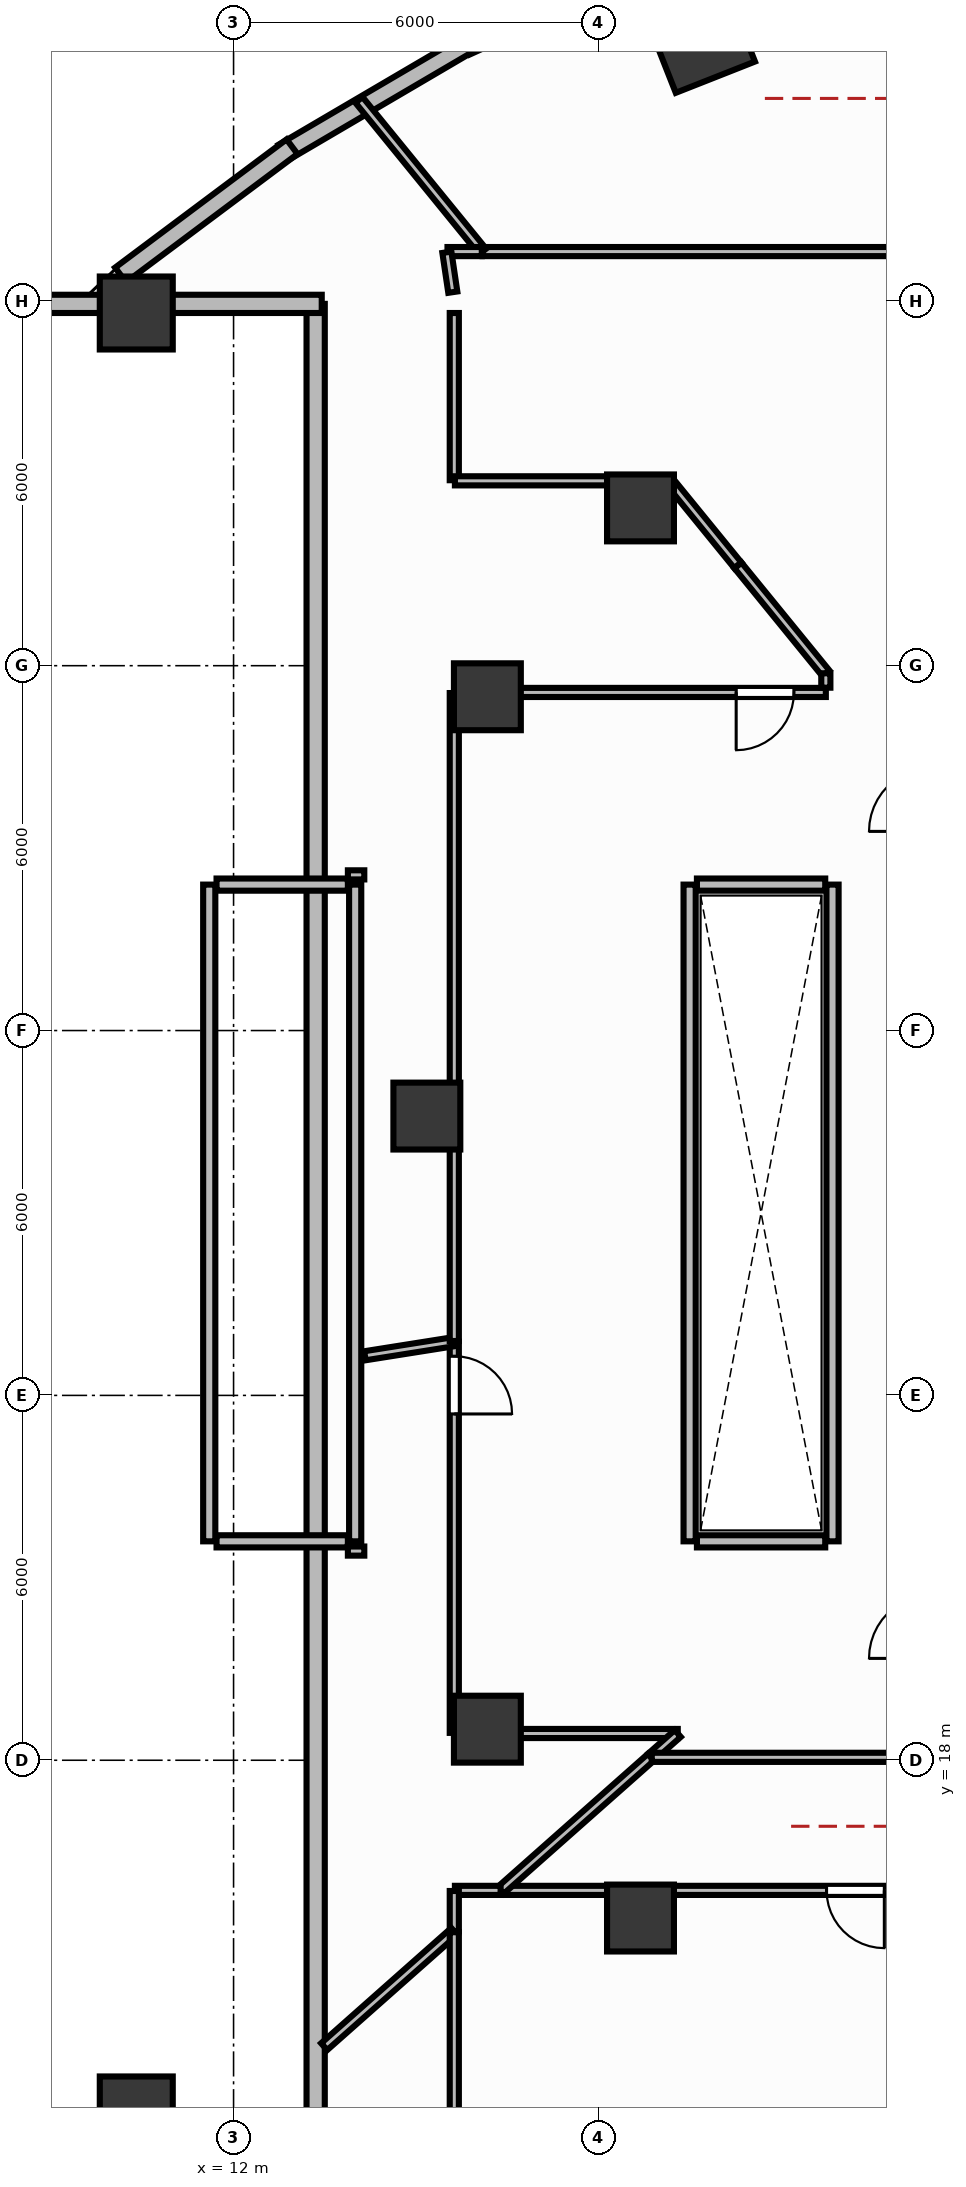
"""IFC4 building model, lengths in metres.
Left out: names, types, materials, properties, quantities, classifications, styles, units other than length and angle.
Written with IfcOpenShell. Run it as: python <this file> out.ifc"""

import sys

from ifc_helpers import new_model, si_unit, direction, frame, frame_2d, origin, origin_2d, place, context, subcontext, project, spatial, rectangle, extrude, element, fill, save


model = new_model("IFC4")
c1 = context("Model", 3, precision=1e-05, world=origin(), true_north=direction((0.0, 1.0)))
c2 = subcontext(c1, "Body", "Model", "MODEL_VIEW")
j1 = project(units=[si_unit("LENGTHUNIT", "METRE"), si_unit("PLANEANGLEUNIT", "RADIAN")], contexts=[c1])
p1 = place(None, origin())
s1 = spatial("IfcSite", under=j1, at=p1, CompositionType="ELEMENT")
p2 = place(p1, origin())
s2 = spatial("IfcBuilding", under=s1, at=p2, CompositionType="ELEMENT")
p3 = place(p2, frame((0.0, 0.0, 10.2)))
s3 = spatial("IfcBuildingStorey", under=s2, at=p3, CompositionType="ELEMENT", Elevation=10.2)
for number, where, z_axis, x_axis in (
    (1, (10.4, 12.2, -0.3), (0.0, 0.0, 1.0), (1.0, 0.0, 0.0)),
    (2, (10.4, 41.8, -0.3), (0.0, 0.0, 1.0), (1.0, 0.0, 0.0)),
):
    element("IfcColumn", number, at=place(p3, frame(where, z_axis=z_axis, x_axis=x_axis)), inside=s3, PredefinedType="COLUMN", context=c2, shape_type="SweptSolid", body=[
        extrude(rectangle(XDim=1.2, YDim=1.2, at=origin_2d()), origin(), (0.0, 0.0, 1.0), 4.75),
    ])
p4 = place(p3, frame((19.667, 46.329, -0.0), z_axis=(0.0, 0.0, 1.0), x_axis=(0.930225540858, 0.366988341962, 0.0)))
e3 = element("IfcColumn", 3, at=p4, inside=s3, PredefinedType="COLUMN", context=c2, shape_type="SweptSolid", body=[
    extrude(rectangle(XDim=1.4, YDim=1.4, at=origin_2d()), origin(), (0.0, 0.0, 1.0), 4.451),
])
for number, where, z_axis, x_axis in (
    (4, (18.692, 38.595, -0.0), (0.0, 0.0, 1.0), (1.0, 0.0, 0.0)),
    (5, (16.174, 35.489, -0.0), (0.0, 0.0, 1.0), (1.0, 0.0, 0.0)),
    (6, (15.179, 28.594, -0.0), (0.0, 0.0, 1.0), (1.0, 0.0, 0.0)),
    (7, (16.174, 18.511, -0.0), (0.0, 0.0, 1.0), (1.0, 0.0, 0.0)),
    (8, (18.692, 15.405, -0.0), (0.0, 0.0, 1.0), (1.0, 0.0, 0.0)),
):
    element("IfcColumn", number, at=place(p3, frame(where, z_axis=z_axis, x_axis=x_axis)), inside=s3, PredefinedType="COLUMN", context=c2, shape_type="SweptSolid", body=[
        extrude(rectangle(XDim=1.1, YDim=1.1, at=origin_2d()), origin(), (0.0, 0.0, 1.0), 4.451),
    ])
p5 = place(p3, frame((19.191, 47.717, 0.0), z_axis=(0.0, 0.0, 1.0), x_axis=(-0.910608120407, -0.413270917254, 0.0)))
e9 = element("IfcWall", 9, at=p5, inside=s3, PredefinedType="STANDARD", context=c2, shape_type="SweptSolid", body=[
    extrude(rectangle(XDim=3.7, YDim=0.3, at=frame_2d((1.85, 0.0))), origin(), (0.0, 0.0, 1.0), 4.45),
])
p6 = place(p5, frame((0.65, 0.0, 1.5)))
e10 = element("IfcOpeningElement", 10, at=p6, cuts=e9, PredefinedType="OPENING", context=c2, shape_type="SweptSolid", body=[
    extrude(rectangle(XDim=2.4, YDim=1.2, at=frame_2d((1.2, 0.6))), frame((0.0, 0.165, 0.0), z_axis=(0.0, -1.0, 0.0), x_axis=(1.0, 0.0, 0.0)), (0.0, 0.0, 1.0), 0.33),
])
p7 = place(p3, frame((15.951, 46.278, 0.0), z_axis=(0.0, 0.0, 1.0), x_axis=(-0.8624654944, -0.506115867139, 0.0)))
e11 = element("IfcWall", 11, at=p7, inside=s3, PredefinedType="STANDARD", context=c2, shape_type="SweptSolid", body=[
    extrude(rectangle(XDim=3.635, YDim=0.3, at=frame_2d((1.818, 0.0))), origin(), (0.0, 0.0, 1.0), 4.45),
])
p8 = place(p3, frame((12.961, 44.535, 0.0), z_axis=(0.0, 0.0, 1.0), x_axis=(-0.800823020995, -0.598901067827, 0.0)))
e12 = element("IfcWall", 12, at=p8, inside=s3, PredefinedType="STANDARD", context=c2, shape_type="SweptSolid", body=[
    extrude(rectangle(XDim=3.521, YDim=0.3, at=frame_2d((1.76, 0.0))), origin(), (0.0, 0.0, 1.0), 4.45),
])
p9 = place(p3, frame((13.35, 12.05, 0.0), z_axis=(0.0, 0.0, 1.0), x_axis=(0.0, 1.0, 0.0)))
e13 = element("IfcWall", 13, at=p9, inside=s3, PredefinedType="STANDARD", context=c2, shape_type="SweptSolid", body=[
    extrude(rectangle(XDim=29.9, YDim=0.3, at=frame_2d((14.95, 0.0))), origin(), (0.0, 0.0, 1.0), 4.45),
])
p10 = place(p3, frame((8.6, 41.95, 0.0), z_axis=(0.0, 0.0, 1.0), x_axis=(1.0, 0.0, 0.0)))
e14 = element("IfcWall", 14, at=p10, inside=s3, PredefinedType="STANDARD", context=c2, shape_type="SweptSolid", body=[
    extrude(rectangle(XDim=4.85, YDim=0.3, at=frame_2d((2.425, 0.0))), origin(), (0.0, 0.0, 1.0), 4.45),
])
for number, where, z_axis, x_axis in (
    (15, (11.6, 21.6, 0.0), (0.0, 0.0, 1.0), (0.0, 1.0, 0.0)),
    (16, (14.0, 21.6, 0.0), (0.0, 0.0, 1.0), (0.0, 1.0, 0.0)),
):
    element("IfcWall", number, at=place(p3, frame(where, z_axis=z_axis, x_axis=x_axis)), inside=s3, PredefinedType="PARTITIONING", context=c2, shape_type="SweptSolid", body=[
        extrude(rectangle(XDim=10.8, YDim=0.2, at=frame_2d((5.4, 0.0))), origin(), (0.0, 0.0, 1.0), 3.46),
    ])
for number, where, z_axis, x_axis in (
    (17, (11.72, 21.6, 0.0), (0.0, 0.0, 1.0), (1.0, 0.0, 0.0)),
    (18, (11.72, 32.4, 0.0), (0.0, 0.0, 1.0), (1.0, 0.0, 0.0)),
):
    element("IfcWall", number, at=place(p3, frame(where, z_axis=z_axis, x_axis=x_axis)), inside=s3, PredefinedType="PARTITIONING", context=c2, shape_type="SweptSolid", body=[
        extrude(rectangle(XDim=2.16, YDim=0.2, at=frame_2d((1.08, 0.0))), origin(), (0.0, 0.0, 1.0), 3.46),
    ])
for number, where, z_axis, x_axis in (
    (19, (19.5, 21.6, 0.0), (0.0, 0.0, 1.0), (0.0, 1.0, 0.0)),
    (20, (21.85, 21.6, 0.0), (0.0, 0.0, 1.0), (0.0, 1.0, 0.0)),
):
    element("IfcWall", number, at=place(p3, frame(where, z_axis=z_axis, x_axis=x_axis)), inside=s3, PredefinedType="PARTITIONING", context=c2, shape_type="SweptSolid", body=[
        extrude(rectangle(XDim=10.8, YDim=0.2, at=frame_2d((5.4, 0.0))), origin(), (0.0, 0.0, 1.0), 3.46),
    ])
for number, where, z_axis, x_axis in (
    (21, (19.62, 21.6, 0.0), (0.0, 0.0, 1.0), (1.0, 0.0, 0.0)),
    (22, (19.62, 32.4, 0.0), (0.0, 0.0, 1.0), (1.0, 0.0, 0.0)),
):
    element("IfcWall", number, at=place(p3, frame(where, z_axis=z_axis, x_axis=x_axis)), inside=s3, PredefinedType="PARTITIONING", context=c2, shape_type="SweptSolid", body=[
        extrude(rectangle(XDim=2.11, YDim=0.2, at=frame_2d((1.055, 0.0))), origin(), (0.0, 0.0, 1.0), 3.46),
    ])
p11 = place(p3, frame((15.63, 24.885, 0.0), z_axis=(0.0, 0.0, 1.0), x_axis=(0.0, -1.0, 0.0)))
e23 = element("IfcWall", 23, at=p11, inside=s3, PredefinedType="PARTITIONING", context=c2, shape_type="SweptSolid", body=[
    extrude(rectangle(XDim=6.435, YDim=0.15, at=frame_2d((3.217, 0.0))), origin(), (0.0, 0.0, 1.0), 3.46),
])
p12 = place(p11, frame((0.24, 0.0, 0.0)))
e24 = element("IfcOpeningElement", 24, at=p12, cuts=e23, PredefinedType="OPENING", context=c2, shape_type="SweptSolid", body=[
    extrude(rectangle(XDim=0.95, YDim=2.15, at=frame_2d((0.475, 1.075))), frame((0.0, 0.09, 0.0), z_axis=(0.0, -1.0, 0.0), x_axis=(1.0, 0.0, 0.0)), (0.0, 0.0, 1.0), 0.18),
])
p13 = place(p3, frame((24.298, 15.86, 0.0), z_axis=(0.0, 0.0, 1.0), x_axis=(-1.0, 0.0, 0.0)))
e25 = element("IfcWall", 25, at=p13, inside=s3, PredefinedType="PARTITIONING", context=c2, shape_type="SweptSolid", body=[
    extrude(rectangle(XDim=7.892, YDim=0.15, at=frame_2d((3.946, 0.0))), origin(), (0.0, 0.0, 1.0), 3.46),
])
p14 = place(p13, frame((1.596, 0.0, 0.0)))
e26 = element("IfcOpeningElement", 26, at=p14, cuts=e25, PredefinedType="OPENING", context=c2, shape_type="SweptSolid", body=[
    extrude(rectangle(XDim=0.95, YDim=2.15, at=frame_2d((0.475, 1.075))), frame((0.0, 0.09, 0.0), z_axis=(0.0, -1.0, 0.0), x_axis=(1.0, 0.0, 0.0)), (0.0, 0.0, 1.0), 0.18),
])
p15 = place(p3, frame((25.79, 42.81, 0.0), z_axis=(0.0, 0.0, 1.0), x_axis=(-1.0, 0.0, 0.0)))
e27 = element("IfcWall", 27, at=p15, inside=s3, PredefinedType="PARTITIONING", context=c2, shape_type="SweptSolid", body=[
    extrude(rectangle(XDim=9.695, YDim=0.15, at=frame_2d((4.847, 0.0))), origin(), (0.0, 0.0, 1.0), 3.46),
])
p16 = place(p15, frame((0.24, 0.0, 0.0)))
e28 = element("IfcOpeningElement", 28, at=p16, cuts=e27, PredefinedType="OPENING", context=c2, shape_type="SweptSolid", body=[
    extrude(rectangle(XDim=0.95, YDim=2.15, at=frame_2d((0.475, 1.075))), frame((0.0, 0.09, 0.0), z_axis=(0.0, -1.0, 0.0), x_axis=(1.0, 0.0, 0.0)), (0.0, 0.0, 1.0), 0.18),
])
p17 = place(p3, frame((21.74, 35.56, 0.0), z_axis=(0.0, 0.0, 1.0), x_axis=(-1.0, 0.0, 0.0)))
e29 = element("IfcWall", 29, at=p17, inside=s3, PredefinedType="PARTITIONING", context=c2, shape_type="SweptSolid", body=[
    extrude(rectangle(XDim=6.1, YDim=0.15, at=frame_2d((3.05, 0.0))), origin(), (0.0, 0.0, 1.0), 3.46),
])
p18 = place(p17, frame((0.524, 0.0, 0.0)))
e30 = element("IfcOpeningElement", 30, at=p18, cuts=e29, PredefinedType="OPENING", context=c2, shape_type="SweptSolid", body=[
    extrude(rectangle(XDim=0.95, YDim=2.15, at=frame_2d((0.475, 1.075))), frame((0.0, 0.09, 0.0), z_axis=(0.0, -1.0, 0.0), x_axis=(1.0, 0.0, 0.0)), (0.0, 0.0, 1.0), 0.18),
])
p19 = place(p3, frame((13.88, 21.44, 0.0), z_axis=(0.0, 0.0, 1.0), x_axis=(1.0, 0.0, 0.0)))
e31 = element("IfcWall", 31, at=p19, inside=s3, PredefinedType="PARTITIONING", context=c2, shape_type="SweptSolid", body=[
    extrude(rectangle(XDim=0.27, YDim=0.15, at=frame_2d((0.135, 0.0))), origin(), (0.0, 0.0, 1.0), 3.46),
])
p20 = place(p3, frame((14.16, 24.652, 0.0), z_axis=(0.0, 0.0, 1.0), x_axis=(0.987700362049, 0.156358545686, 0.0)))
e32 = element("IfcWall", 32, at=p20, inside=s3, PredefinedType="PARTITIONING", context=c2, shape_type="SweptSolid", body=[
    extrude(rectangle(XDim=1.488, YDim=0.15, at=frame_2d((0.744, 0.0))), origin(), (0.0, 0.0, 1.0), 3.46),
])
p21 = place(p3, frame((15.64, 18.44, 0.0), z_axis=(0.0, 0.0, 1.0), x_axis=(1.0, 0.0, 0.0)))
e33 = element("IfcWall", 33, at=p21, inside=s3, PredefinedType="PARTITIONING", context=c2, shape_type="SweptSolid", body=[
    extrude(rectangle(XDim=3.665, YDim=0.15, at=frame_2d((1.833, 0.0))), origin(), (0.0, 0.0, 1.0), 3.46),
])
p22 = place(p3, frame((19.305, 18.44, 0.0), z_axis=(0.0, 0.0, 1.0), x_axis=(-0.748582262775, -0.66304192617, 0.0)))
e34 = element("IfcWall", 34, at=p22, inside=s3, PredefinedType="PARTITIONING", context=c2, shape_type="SweptSolid", body=[
    extrude(rectangle(XDim=0.585, YDim=0.15, at=frame_2d((0.292, 0.0))), origin(), (0.0, 0.0, 1.0), 3.46),
])
p23 = place(p3, frame((18.862, 18.048, 0.0), z_axis=(0.0, 0.0, 1.0), x_axis=(-0.748677348716, -0.662934557494, 0.0)))
e35 = element("IfcWall", 35, at=p23, inside=s3, PredefinedType="PARTITIONING", context=c2, shape_type="SweptSolid", body=[
    extrude(rectangle(XDim=3.3, YDim=0.15, at=frame_2d((1.65, 0.0))), origin(), (0.0, 0.0, 1.0), 3.46),
])
p24 = place(p3, frame((16.392, 15.86, 0.0), z_axis=(0.0, 0.0, 1.0), x_axis=(-1.0, 0.0, 0.0)))
e36 = element("IfcWall", 36, at=p24, inside=s3, PredefinedType="PARTITIONING", context=c2, shape_type="SweptSolid", body=[
    extrude(rectangle(XDim=0.752, YDim=0.15, at=frame_2d((0.376, 0.0))), origin(), (0.0, 0.0, 1.0), 3.46),
])
p25 = place(p3, frame((15.63, 15.85, 0.0), z_axis=(0.0, 0.0, 1.0), x_axis=(0.0, -1.0, 0.0)))
e37 = element("IfcWall", 37, at=p25, inside=s3, PredefinedType="PARTITIONING", context=c2, shape_type="SweptSolid", body=[
    extrude(rectangle(XDim=0.665, YDim=0.15, at=frame_2d((0.333, 0.0))), origin(), (0.0, 0.0, 1.0), 3.46),
])
p26 = place(p3, frame((15.63, 15.185, 0.0), z_axis=(0.0, 0.0, 1.0), x_axis=(-0.748642683945, -0.662973703683, 0.0)))
e38 = element("IfcWall", 38, at=p26, inside=s3, PredefinedType="PARTITIONING", context=c2, shape_type="SweptSolid", body=[
    extrude(rectangle(XDim=2.858, YDim=0.15, at=frame_2d((1.429, 0.0))), origin(), (0.0, 0.0, 1.0), 3.46),
])
p27 = place(p3, frame((18.877, 18.048, 0.0), z_axis=(0.0, 0.0, 1.0), x_axis=(1.0, 0.0, 0.0)))
e39 = element("IfcWall", 39, at=p27, inside=s3, PredefinedType="PARTITIONING", context=c2, shape_type="SweptSolid", body=[
    extrude(rectangle(XDim=6.339, YDim=0.15, at=frame_2d((3.169, 0.0))), origin(), (0.0, 0.0, 1.0), 3.46),
])
p28 = place(p3, frame((15.63, 15.172, 0.0), z_axis=(0.0, 0.0, 1.0), x_axis=(0.0, -1.0, 0.0)))
e40 = element("IfcWall", 40, at=p28, inside=s3, PredefinedType="PARTITIONING", context=c2, shape_type="SweptSolid", body=[
    extrude(rectangle(XDim=2.972, YDim=0.15, at=frame_2d((1.486, 0.0))), origin(), (0.0, 0.0, 1.0), 3.46),
])
p29 = place(p3, frame((16.095, 42.81, 0.0), z_axis=(0.0, 0.0, 1.0), x_axis=(-0.631654377787, 0.775250119008, 0.0)))
e41 = element("IfcWall", 41, at=p29, inside=s3, PredefinedType="PARTITIONING", context=c2, shape_type="SweptSolid", body=[
    extrude(rectangle(XDim=3.219, YDim=0.15, at=frame_2d((1.609, 0.0))), origin(), (0.0, 0.0, 1.0), 3.46),
])
p30 = place(p3, frame((16.082, 42.81, 0.0), z_axis=(0.0, 0.0, 1.0), x_axis=(-1.0, 0.0, 0.0)))
e42 = element("IfcWall", 42, at=p30, inside=s3, PredefinedType="PARTITIONING", context=c2, shape_type="SweptSolid", body=[
    extrude(rectangle(XDim=0.564, YDim=0.15, at=frame_2d((0.282, 0.0))), origin(), (0.0, 0.0, 1.0), 3.46),
])
p31 = place(p3, frame((15.508, 42.799, 0.0), z_axis=(0.0, 0.0, 1.0), x_axis=(0.146882189547, -0.989153993266, 0.0)))
e43 = element("IfcWall", 43, at=p31, inside=s3, PredefinedType="PARTITIONING", context=c2, shape_type="SweptSolid", body=[
    extrude(rectangle(XDim=0.663, YDim=0.15, at=frame_2d((0.332, 0.0))), origin(), (0.0, 0.0, 1.0), 3.46),
])
p32 = place(p3, frame((15.63, 41.8, 0.0), z_axis=(0.0, 0.0, 1.0), x_axis=(0.0, -1.0, 0.0)))
e44 = element("IfcWall", 44, at=p32, inside=s3, PredefinedType="PARTITIONING", context=c2, shape_type="SweptSolid", body=[
    extrude(rectangle(XDim=2.75, YDim=0.15, at=frame_2d((1.375, 0.0))), origin(), (0.0, 0.0, 1.0), 3.46),
])
p33 = place(p3, frame((15.64, 39.04, 0.0), z_axis=(0.0, 0.0, 1.0), x_axis=(1.0, 0.0, 0.0)))
e45 = element("IfcWall", 45, at=p33, inside=s3, PredefinedType="PARTITIONING", context=c2, shape_type="SweptSolid", body=[
    extrude(rectangle(XDim=3.521, YDim=0.15, at=frame_2d((1.761, 0.0))), origin(), (0.0, 0.0, 1.0), 3.46),
])
p34 = place(p3, frame((19.161, 39.04, 0.0), z_axis=(0.0, 0.0, 1.0), x_axis=(0.631654738662, -0.775249824977, 0.0)))
e46 = element("IfcWall", 46, at=p34, inside=s3, PredefinedType="PARTITIONING", context=c2, shape_type="SweptSolid", body=[
    extrude(rectangle(XDim=1.79, YDim=0.15, at=frame_2d((0.895, 0.0))), origin(), (0.0, 0.0, 1.0), 3.46),
])
p35 = place(p3, frame((20.296, 37.648, 0.0), z_axis=(0.0, 0.0, 1.0), x_axis=(0.631596904156, -0.775296943539, 0.0)))
e47 = element("IfcWall", 47, at=p35, inside=s3, PredefinedType="PARTITIONING", context=c2, shape_type="SweptSolid", body=[
    extrude(rectangle(XDim=2.287, YDim=0.15, at=frame_2d((1.144, 0.0))), origin(), (0.0, 0.0, 1.0), 3.46),
])
p36 = place(p3, frame((21.74, 35.875, 0.0), z_axis=(0.0, 0.0, 1.0), x_axis=(0.0, -1.0, 0.0)))
e48 = element("IfcWall", 48, at=p36, inside=s3, PredefinedType="PARTITIONING", context=c2, shape_type="SweptSolid", body=[
    extrude(rectangle(XDim=0.237, YDim=0.15, at=frame_2d((0.119, 0.0))), origin(), (0.0, 0.0, 1.0), 3.46),
])
p37 = place(p3, frame((15.63, 35.55, 0.0), z_axis=(0.0, 0.0, 1.0), x_axis=(0.0, -1.0, 0.0)))
e49 = element("IfcWall", 49, at=p37, inside=s3, PredefinedType="PARTITIONING", context=c2, shape_type="SweptSolid", body=[
    extrude(rectangle(XDim=10.656, YDim=0.15, at=frame_2d((5.328, 0.0))), origin(), (0.0, 0.0, 1.0), 3.46),
])
p38 = place(p3, frame((14.15, 32.56, 0.0), z_axis=(0.0, 0.0, 1.0), x_axis=(-1.0, 0.0, 0.0)))
e50 = element("IfcWall", 50, at=p38, inside=s3, PredefinedType="PARTITIONING", context=c2, shape_type="SweptSolid", body=[
    extrude(rectangle(XDim=0.27, YDim=0.15, at=frame_2d((0.135, 0.0))), origin(), (0.0, 0.0, 1.0), 3.46),
])
p39 = place(p12, origin())
e51 = element("IfcDoor", 51, at=p39, inside=s3, OperationType="SINGLE_SWING_RIGHT", PredefinedType="DOOR", context=c2, shape_type="SweptSolid", body=[
    extrude(rectangle(XDim=0.95, YDim=2.15, at=frame_2d((0.475, 1.075))), frame((0.0, 0.025, 0.0), z_axis=(0.0, -1.0, 0.0), x_axis=(1.0, 0.0, 0.0)), (0.0, 0.0, 1.0), 0.05),
])
fill(e24, e51)
p40 = place(p14, origin())
e52 = element("IfcDoor", 52, at=p40, inside=s3, OperationType="SINGLE_SWING_LEFT", PredefinedType="DOOR", context=c2, shape_type="SweptSolid", body=[
    extrude(rectangle(XDim=0.95, YDim=2.15, at=frame_2d((0.475, 1.075))), frame((0.0, 0.025, 0.0), z_axis=(0.0, -1.0, 0.0), x_axis=(1.0, 0.0, 0.0)), (0.0, 0.0, 1.0), 0.05),
])
fill(e26, e52)
p41 = place(p18, origin())
e53 = element("IfcDoor", 53, at=p41, inside=s3, OperationType="SINGLE_SWING_RIGHT", PredefinedType="DOOR", context=c2, shape_type="SweptSolid", body=[
    extrude(rectangle(XDim=0.95, YDim=2.15, at=frame_2d((0.475, 1.075))), frame((0.0, 0.025, 0.0), z_axis=(0.0, -1.0, 0.0), x_axis=(1.0, 0.0, 0.0)), (0.0, 0.0, 1.0), 0.05),
])
fill(e30, e53)
save(model, sys.argv[1])
